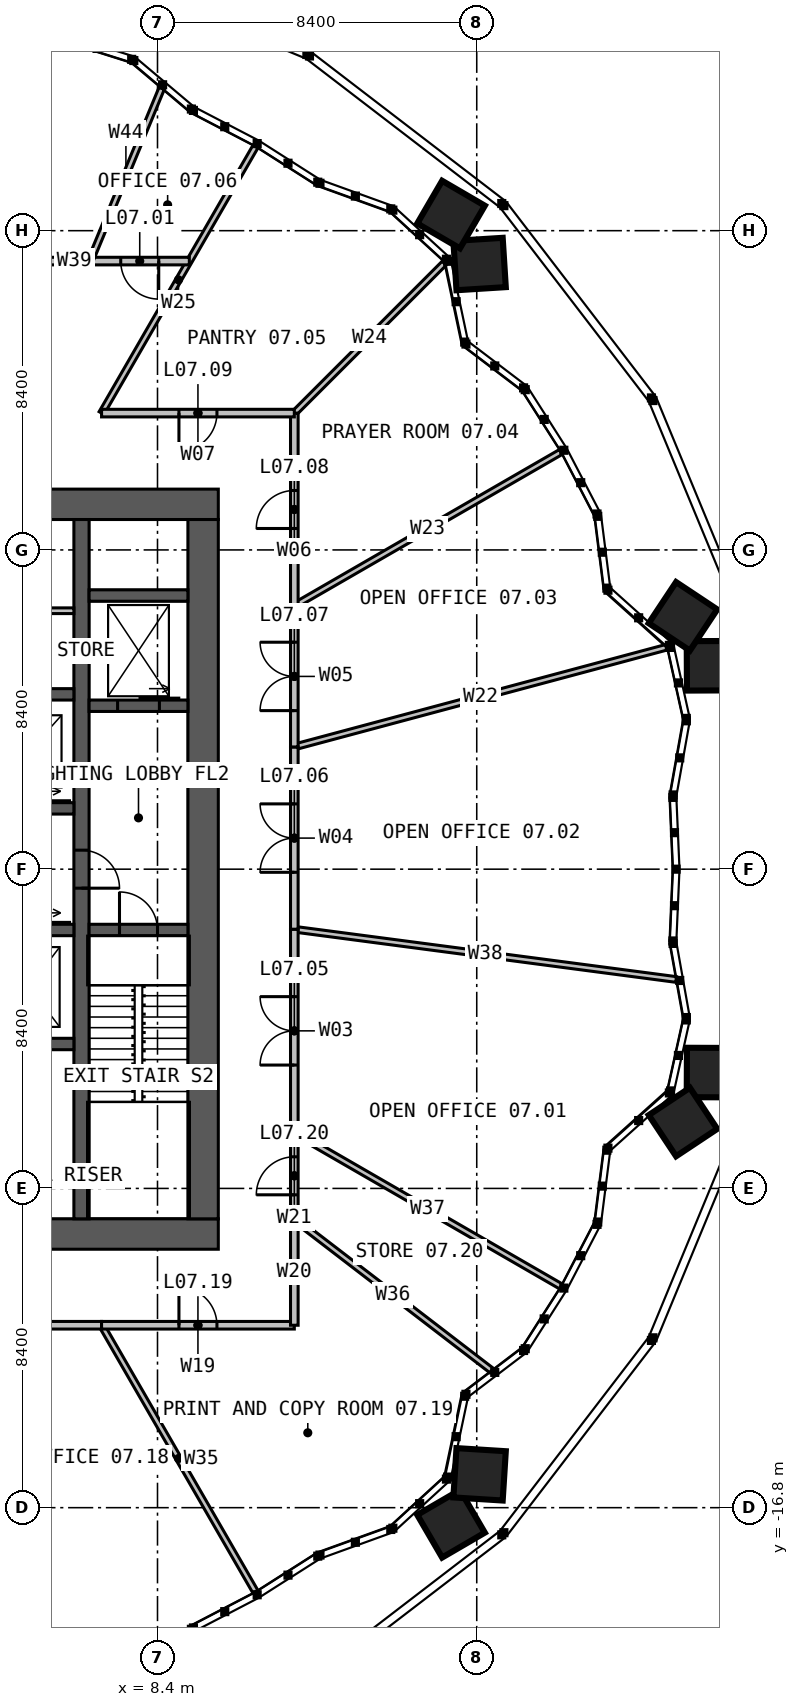
"""IFC4 building model, lengths in metres.
Left out: names, types, materials, properties, quantities, classifications, styles, units other than length and angle.
Written with IfcOpenShell. Run it as: python <this file> out.ifc"""

import sys

from ifc_helpers import new_model, si_unit, direction, frame, frame_2d, origin, place, context, subcontext, project, spatial, rectangle, extrude, element, fill, save


model = new_model("IFC4")
c1 = context("Model", 3, precision=1e-05, world=origin(), true_north=direction((0.0, 1.0)))
c2 = subcontext(c1, "Body", "Model", "MODEL_VIEW")
j1 = project(units=[si_unit("LENGTHUNIT", "METRE"), si_unit("PLANEANGLEUNIT", "RADIAN")], contexts=[c1])
p1 = place(None, origin())
s1 = spatial("IfcSite", under=j1, at=p1, CompositionType="ELEMENT")
p2 = place(p1, origin())
s2 = spatial("IfcBuilding", under=s1, at=p2, CompositionType="ELEMENT")
p3 = place(p2, frame((0.0, 0.0, 33.0)))
s3 = spatial("IfcBuildingStorey", under=s2, at=p3, CompositionType="ELEMENT", Elevation=33.0)
p4 = place(p3, frame((-10.0, 9.6, 0.0), z_axis=(0.0, 0.0, 1.0), x_axis=(1.0, 0.0, 0.0)))
e1 = element("IfcWall", 1, at=p4, inside=s3, PredefinedType="SOLIDWALL", context=c2, shape_type="SweptSolid", body=[
    extrude(rectangle(XDim=20.0, YDim=0.8, at=frame_2d((10.0, 0.0))), origin(), (0.0, 0.0, 1.0), 4.0),
])
p5 = place(p4, frame((9.4, 0.0, 0.0)))
e2 = element("IfcOpeningElement", 2, at=p5, cuts=e1, PredefinedType="OPENING", context=c2, shape_type="SweptSolid", body=[
    extrude(rectangle(XDim=1.2, YDim=2.2, at=frame_2d((0.6, 1.1))), frame((0.0, 0.41, 0.0), z_axis=(0.0, -1.0, 0.0), x_axis=(1.0, 0.0, 0.0)), (0.0, 0.0, 1.0), 0.82),
])
p6 = place(p3, frame((10.0, -9.6, 0.0), z_axis=(0.0, 0.0, 1.0), x_axis=(-1.0, 0.0, 0.0)))
e3 = element("IfcWall", 3, at=p6, inside=s3, PredefinedType="SOLIDWALL", context=c2, shape_type="SweptSolid", body=[
    extrude(rectangle(XDim=20.0, YDim=0.8, at=frame_2d((10.0, 0.0))), origin(), (0.0, 0.0, 1.0), 4.0),
])
p7 = place(p6, frame((6.875, 0.0, 0.0)))
e4 = element("IfcOpeningElement", 4, at=p7, cuts=e3, PredefinedType="OPENING", context=c2, shape_type="SweptSolid", body=[
    extrude(rectangle(XDim=1.2, YDim=2.2, at=frame_2d((0.6, 1.1))), frame((0.0, 0.41, 0.0), z_axis=(0.0, -1.0, 0.0), x_axis=(1.0, 0.0, 0.0)), (0.0, 0.0, 1.0), 0.82),
])
p8 = place(p3, frame((9.6, -9.2, 0.0), z_axis=(0.0, 0.0, 1.0), x_axis=(0.0, 1.0, 0.0)))
e5 = element("IfcWall", 5, at=p8, inside=s3, PredefinedType="SOLIDWALL", context=c2, shape_type="SweptSolid", body=[
    extrude(rectangle(XDim=18.4, YDim=0.8, at=frame_2d((9.2, 0.0))), origin(), (0.0, 0.0, 1.0), 4.0),
])
p9 = place(p3, frame((6.4, 9.2, 0.0), z_axis=(0.0, 0.0, 1.0), x_axis=(0.0, -1.0, 0.0)))
e6 = element("IfcWall", 6, at=p9, inside=s3, PredefinedType="SOLIDWALL", context=c2, shape_type="SweptSolid", body=[
    extrude(rectangle(XDim=18.4, YDim=0.4, at=frame_2d((9.2, 0.0))), origin(), (0.0, 0.0, 1.0), 4.0),
])
p10 = place(p9, frame((8.7, 0.0, 0.0)))
e7 = element("IfcOpeningElement", 7, at=p10, cuts=e6, PredefinedType="OPENING", context=c2, shape_type="SweptSolid", body=[
    extrude(rectangle(XDim=1.0, YDim=2.2, at=frame_2d((0.5, 1.1))), frame((0.0, 0.21, 0.0), z_axis=(0.0, -1.0, 0.0), x_axis=(1.0, 0.0, 0.0)), (0.0, 0.0, 1.0), 0.42),
])
p11 = place(p3, frame((1.35, 1.6, 0.0), z_axis=(0.0, 0.0, 1.0), x_axis=(1.0, 0.0, 0.0)))
e8 = element("IfcWall", 8, at=p11, inside=s3, PredefinedType="SOLIDWALL", context=c2, shape_type="SweptSolid", body=[
    extrude(rectangle(XDim=4.85, YDim=0.3, at=frame_2d((2.425, 0.0))), origin(), (0.0, 0.0, 1.0), 4.0),
])
p12 = place(p11, frame((0.6, 0.0, 0.0)))
e9 = element("IfcOpeningElement", 9, at=p12, cuts=e8, PredefinedType="OPENING", context=c2, shape_type="SweptSolid", body=[
    extrude(rectangle(XDim=1.1, YDim=2.2, at=frame_2d((0.55, 1.1))), frame((0.0, 0.16, 0.0), z_axis=(0.0, -1.0, 0.0), x_axis=(1.0, 0.0, 0.0)), (0.0, 0.0, 1.0), 0.32),
])
p13 = place(p11, frame((3.125, 0.0, 0.0)))
e10 = element("IfcOpeningElement", 10, at=p13, cuts=e8, PredefinedType="OPENING", context=c2, shape_type="SweptSolid", body=[
    extrude(rectangle(XDim=1.1, YDim=2.2, at=frame_2d((0.55, 1.1))), frame((0.0, 0.16, 0.0), z_axis=(0.0, -1.0, 0.0), x_axis=(1.0, 0.0, 0.0)), (0.0, 0.0, 1.0), 0.32),
])
p14 = place(p3, frame((1.35, 4.6, 0.0), z_axis=(0.0, 0.0, 1.0), x_axis=(1.0, 0.0, 0.0)))
e11 = element("IfcWall", 11, at=p14, inside=s3, PredefinedType="SOLIDWALL", context=c2, shape_type="SweptSolid", body=[
    extrude(rectangle(XDim=4.85, YDim=0.3, at=frame_2d((2.425, 0.0))), origin(), (0.0, 0.0, 1.0), 4.0),
])
p15 = place(p3, frame((3.85, -1.6, 0.0), z_axis=(0.0, 0.0, 1.0), x_axis=(1.0, 0.0, 0.0)))
e12 = element("IfcWall", 12, at=p15, inside=s3, PredefinedType="SOLIDWALL", context=c2, shape_type="SweptSolid", body=[
    extrude(rectangle(XDim=2.35, YDim=0.3, at=frame_2d((1.175, 0.0))), origin(), (0.0, 0.0, 1.0), 4.0),
])
p16 = place(p15, frame((0.625, 0.0, 0.0)))
e13 = element("IfcOpeningElement", 13, at=p16, cuts=e12, PredefinedType="OPENING", context=c2, shape_type="SweptSolid", body=[
    extrude(rectangle(XDim=1.1, YDim=2.2, at=frame_2d((0.55, 1.1))), frame((0.0, 0.16, 0.0), z_axis=(0.0, -1.0, 0.0), x_axis=(1.0, 0.0, 0.0)), (0.0, 0.0, 1.0), 0.32),
])
p17 = place(p3, frame((3.85, -4.6, 0.0), z_axis=(0.0, 0.0, 1.0), x_axis=(1.0, 0.0, 0.0)))
e14 = element("IfcWall", 14, at=p17, inside=s3, PredefinedType="SOLIDWALL", context=c2, shape_type="SweptSolid", body=[
    extrude(rectangle(XDim=2.35, YDim=0.3, at=frame_2d((1.175, 0.0))), origin(), (0.0, 0.0, 1.0), 4.0),
])
p18 = place(p3, frame((6.6, -1.6, 0.0), z_axis=(0.0, 0.0, 1.0), x_axis=(1.0, 0.0, 0.0)))
e15 = element("IfcWall", 15, at=p18, inside=s3, PredefinedType="SOLIDWALL", context=c2, shape_type="SweptSolid", body=[
    extrude(rectangle(XDim=2.6, YDim=0.3, at=frame_2d((1.3, 0.0))), origin(), (0.0, 0.0, 1.0), 4.0),
])
p19 = place(p18, frame((0.8, 0.0, 0.0)))
e16 = element("IfcOpeningElement", 16, at=p19, cuts=e15, PredefinedType="OPENING", context=c2, shape_type="SweptSolid", body=[
    extrude(rectangle(XDim=1.0, YDim=2.2, at=frame_2d((0.5, 1.1))), frame((0.0, 0.16, 0.0), z_axis=(0.0, -1.0, 0.0), x_axis=(1.0, 0.0, 0.0)), (0.0, 0.0, 1.0), 0.32),
])
p20 = place(p3, frame((6.6, 4.3, 0.0), z_axis=(0.0, 0.0, 1.0), x_axis=(1.0, 0.0, 0.0)))
e17 = element("IfcWall", 17, at=p20, inside=s3, PredefinedType="SOLIDWALL", context=c2, shape_type="SweptSolid", body=[
    extrude(rectangle(XDim=2.6, YDim=0.3, at=frame_2d((1.3, 0.0))), origin(), (0.0, 0.0, 1.0), 4.0),
])
p21 = place(p20, frame((0.75, 0.0, 0.0)))
e18 = element("IfcOpeningElement", 18, at=p21, cuts=e17, PredefinedType="OPENING", context=c2, shape_type="SweptSolid", body=[
    extrude(rectangle(XDim=1.1, YDim=2.2, at=frame_2d((0.55, 1.1))), frame((0.0, 0.16, 0.0), z_axis=(0.0, -1.0, 0.0), x_axis=(1.0, 0.0, 0.0)), (0.0, 0.0, 1.0), 0.32),
])
p22 = place(p3, frame((6.6, 7.2, 0.0), z_axis=(0.0, 0.0, 1.0), x_axis=(1.0, 0.0, 0.0)))
e19 = element("IfcWall", 19, at=p22, inside=s3, PredefinedType="SOLIDWALL", context=c2, shape_type="SweptSolid", body=[
    extrude(rectangle(XDim=2.6, YDim=0.3, at=frame_2d((1.3, 0.0))), origin(), (0.0, 0.0, 1.0), 4.0),
])
p23 = place(p3, frame((1.35, 6.8, 0.0), z_axis=(0.0, 0.0, 1.0), x_axis=(1.0, 0.0, 0.0)))
e20 = element("IfcWall", 20, at=p23, inside=s3, PredefinedType="PARTITIONING", context=c2, shape_type="SweptSolid", body=[
    extrude(rectangle(XDim=4.85, YDim=0.15, at=frame_2d((2.425, 0.0))), origin(), (0.0, 0.0, 1.0), 3.75),
])
p24 = place(p23, frame((3.15, 0.0, 0.0)))
e21 = element("IfcOpeningElement", 21, at=p24, cuts=e20, PredefinedType="OPENING", context=c2, shape_type="SweptSolid", body=[
    extrude(rectangle(XDim=0.9, YDim=2.2, at=frame_2d((0.45, 1.1))), frame((0.0, 0.085, 0.0), z_axis=(0.0, -1.0, 0.0), x_axis=(1.0, 0.0, 0.0)), (0.0, 0.0, 1.0), 0.17),
])
p25 = place(p3, frame((12.0, -6.928, 0.0), z_axis=(0.0, 0.0, 1.0), x_axis=(0.866020891966, -0.500007814618, 0.0)))
e22 = element("IfcWall", 22, at=p25, inside=s3, PredefinedType="PARTITIONING", context=c2, shape_type="SweptSolid", body=[
    extrude(rectangle(XDim=8.097, YDim=0.15, at=frame_2d((4.048, 0.0))), origin(), (0.0, 0.0, 1.0), 2.79),
])
p26 = place(p3, frame((12.0, -1.58, 0.0), z_axis=(0.0, 0.0, 1.0), x_axis=(0.99144576601, -0.13051932064, 0.0)))
e23 = element("IfcWall", 23, at=p26, inside=s3, PredefinedType="PARTITIONING", context=c2, shape_type="SweptSolid", body=[
    extrude(rectangle(XDim=10.135, YDim=0.15, at=frame_2d((5.067, 0.0))), origin(), (0.0, 0.0, 1.0), 2.79),
])
p27 = place(p3, frame((12.0, 3.215, 0.0), z_axis=(0.0, 0.0, 1.0), x_axis=(0.965923250335, 0.258828658504, 0.0)))
e24 = element("IfcWall", 24, at=p27, inside=s3, PredefinedType="PARTITIONING", context=c2, shape_type="SweptSolid", body=[
    extrude(rectangle(XDim=10.15, YDim=0.15, at=frame_2d((5.075, 0.0))), origin(), (0.0, 0.0, 1.0), 2.79),
])
p28 = place(p3, frame((12.0, 6.928, 0.0), z_axis=(0.0, 0.0, 1.0), x_axis=(0.866020891966, 0.500007814618, 0.0)))
e25 = element("IfcWall", 25, at=p28, inside=s3, PredefinedType="PARTITIONING", context=c2, shape_type="SweptSolid", body=[
    extrude(rectangle(XDim=8.097, YDim=0.15, at=frame_2d((4.048, 0.0))), origin(), (0.0, 0.0, 1.0), 2.79),
])
p29 = place(p3, frame((12.0, 12.0, 0.0), z_axis=(0.0, 0.0, 1.0), x_axis=(0.707106781187, 0.707106781187, 0.0)))
e26 = element("IfcWall", 26, at=p29, inside=s3, PredefinedType="PARTITIONING", context=c2, shape_type="SweptSolid", body=[
    extrude(rectangle(XDim=5.603, YDim=0.15, at=frame_2d((2.802, 0.0))), origin(), (0.0, 0.0, 1.0), 2.79),
])
for number, where, z_axis, x_axis in (
    (27, (6.928, 12.0, 0.0), (0.0, 0.0, 1.0), (0.5, 0.866, 0.0)),
    (28, (6.928, -12.0, 0.0), (0.0, 0.0, 1.0), (0.5, -0.866, 0.0)),
):
    element("IfcWall", number, at=place(p3, frame(where, z_axis=z_axis, x_axis=x_axis)), inside=s3, PredefinedType="PARTITIONING", context=c2, shape_type="SweptSolid", body=[
        extrude(rectangle(XDim=8.097, YDim=0.15, at=frame_2d((4.048, 0.0))), origin(), (0.0, 0.0, 1.0), 2.79),
    ])
p30 = place(p3, frame((12.0, -9.208, 0.0), z_axis=(0.0, 0.0, 1.0), x_axis=(0.793348710976, -0.608767462003, 0.0)))
e29 = element("IfcWall", 29, at=p30, inside=s3, PredefinedType="PARTITIONING", context=c2, shape_type="SweptSolid", body=[
    extrude(rectangle(XDim=6.545, YDim=0.15, at=frame_2d((3.272, 0.0))), origin(), (0.0, 0.0, 1.0), 2.79),
])
p31 = place(p3, frame((12.0, -6.928, 0.0), z_axis=(0.0, 0.0, 1.0), x_axis=(0.0, 1.0, 0.0)))
e30 = element("IfcWall", 30, at=p31, inside=s3, PredefinedType="PARTITIONING", context=c2, shape_type="SweptSolid", body=[
    extrude(rectangle(XDim=5.348, YDim=0.2, at=frame_2d((2.674, 0.0))), origin(), (0.0, 0.0, 1.0), 3.8),
])
p32 = place(p31, frame((1.774, 0.0, 0.0)))
e31 = element("IfcOpeningElement", 31, at=p32, cuts=e30, PredefinedType="OPENING", context=c2, shape_type="SweptSolid", body=[
    extrude(rectangle(XDim=1.8, YDim=2.2, at=frame_2d((0.9, 1.1))), frame((0.0, 0.11, 0.0), z_axis=(0.0, -1.0, 0.0), x_axis=(1.0, 0.0, 0.0)), (0.0, 0.0, 1.0), 0.22),
])
p33 = place(p3, frame((12.0, -1.58, 0.0), z_axis=(0.0, 0.0, 1.0), x_axis=(0.0, 1.0, 0.0)))
e32 = element("IfcWall", 32, at=p33, inside=s3, PredefinedType="PARTITIONING", context=c2, shape_type="SweptSolid", body=[
    extrude(rectangle(XDim=4.795, YDim=0.2, at=frame_2d((2.397, 0.0))), origin(), (0.0, 0.0, 1.0), 3.8),
])
p34 = place(p33, frame((1.498, 0.0, 0.0)))
e33 = element("IfcOpeningElement", 33, at=p34, cuts=e32, PredefinedType="OPENING", context=c2, shape_type="SweptSolid", body=[
    extrude(rectangle(XDim=1.8, YDim=2.2, at=frame_2d((0.9, 1.1))), frame((0.0, 0.11, 0.0), z_axis=(0.0, -1.0, 0.0), x_axis=(1.0, 0.0, 0.0)), (0.0, 0.0, 1.0), 0.22),
])
p35 = place(p3, frame((12.0, 3.215, 0.0), z_axis=(0.0, 0.0, 1.0), x_axis=(0.0, 1.0, 0.0)))
e34 = element("IfcWall", 34, at=p35, inside=s3, PredefinedType="PARTITIONING", context=c2, shape_type="SweptSolid", body=[
    extrude(rectangle(XDim=3.713, YDim=0.2, at=frame_2d((1.856, 0.0))), origin(), (0.0, 0.0, 1.0), 3.8),
])
p36 = place(p35, frame((0.956, 0.0, 0.0)))
e35 = element("IfcOpeningElement", 35, at=p36, cuts=e34, PredefinedType="OPENING", context=c2, shape_type="SweptSolid", body=[
    extrude(rectangle(XDim=1.8, YDim=2.2, at=frame_2d((0.9, 1.1))), frame((0.0, 0.11, 0.0), z_axis=(0.0, -1.0, 0.0), x_axis=(1.0, 0.0, 0.0)), (0.0, 0.0, 1.0), 0.22),
])
p37 = place(p3, frame((12.0, 6.928, 0.0), z_axis=(0.0, 0.0, 1.0), x_axis=(0.0, 1.0, 0.0)))
e36 = element("IfcWall", 36, at=p37, inside=s3, PredefinedType="PARTITIONING", context=c2, shape_type="SweptSolid", body=[
    extrude(rectangle(XDim=5.072, YDim=0.2, at=frame_2d((2.536, 0.0))), origin(), (0.0, 0.0, 1.0), 3.8),
])
p38 = place(p37, frame((2.036, 0.0, 0.0)))
e37 = element("IfcOpeningElement", 37, at=p38, cuts=e36, PredefinedType="OPENING", context=c2, shape_type="SweptSolid", body=[
    extrude(rectangle(XDim=1.0, YDim=2.2, at=frame_2d((0.5, 1.1))), frame((0.0, 0.11, 0.0), z_axis=(0.0, -1.0, 0.0), x_axis=(1.0, 0.0, 0.0)), (0.0, 0.0, 1.0), 0.22),
])
p39 = place(p3, frame((12.0, 12.0, 0.0), z_axis=(0.0, 0.0, 1.0), x_axis=(-1.0, 0.0, 0.0)))
e38 = element("IfcWall", 38, at=p39, inside=s3, PredefinedType="PARTITIONING", context=c2, shape_type="SweptSolid", body=[
    extrude(rectangle(XDim=5.072, YDim=0.2, at=frame_2d((2.536, 0.0))), origin(), (0.0, 0.0, 1.0), 3.8),
])
p40 = place(p39, frame((2.036, 0.0, 0.0)))
e39 = element("IfcOpeningElement", 39, at=p40, cuts=e38, PredefinedType="OPENING", context=c2, shape_type="SweptSolid", body=[
    extrude(rectangle(XDim=1.0, YDim=2.2, at=frame_2d((0.5, 1.1))), frame((0.0, 0.11, 0.0), z_axis=(0.0, -1.0, 0.0), x_axis=(1.0, 0.0, 0.0)), (0.0, 0.0, 1.0), 0.22),
])
p41 = place(p3, frame((9.238, 16.0, 0.0), z_axis=(0.0, 0.0, 1.0), x_axis=(-1.0, 0.0, 0.0)))
e40 = element("IfcWall", 40, at=p41, inside=s3, PredefinedType="PARTITIONING", context=c2, shape_type="SweptSolid", body=[
    extrude(rectangle(XDim=6.057, YDim=0.2, at=frame_2d((3.029, 0.0))), origin(), (0.0, 0.0, 1.0), 3.8),
])
p42 = place(p41, frame((0.805, 0.0, 0.0)))
e41 = element("IfcOpeningElement", 41, at=p42, cuts=e40, PredefinedType="OPENING", context=c2, shape_type="SweptSolid", body=[
    extrude(rectangle(XDim=1.0, YDim=2.2, at=frame_2d((0.5, 1.1))), frame((0.0, 0.11, 0.0), z_axis=(0.0, -1.0, 0.0), x_axis=(1.0, 0.0, 0.0)), (0.0, 0.0, 1.0), 0.22),
])
p43 = place(p3, frame((6.627, 16.0, 0.0), z_axis=(0.0, 0.0, 1.0), x_axis=(0.38266590054, 0.923886794236, 0.0)))
e42 = element("IfcWall", 42, at=p43, inside=s3, PredefinedType="PARTITIONING", context=c2, shape_type="SweptSolid", body=[
    extrude(rectangle(XDim=4.92, YDim=0.15, at=frame_2d((2.46, 0.0))), origin(), (0.0, 0.0, 1.0), 2.79),
])
p44 = place(p3, frame((1.58, -12.0, 0.0), z_axis=(0.0, 0.0, 1.0), x_axis=(1.0, 0.0, 0.0)))
e43 = element("IfcWall", 43, at=p44, inside=s3, PredefinedType="PARTITIONING", context=c2, shape_type="SweptSolid", body=[
    extrude(rectangle(XDim=5.348, YDim=0.2, at=frame_2d((2.674, 0.0))), origin(), (0.0, 0.0, 1.0), 3.8),
])
p45 = place(p44, frame((1.774, 0.0, 0.0)))
e44 = element("IfcOpeningElement", 44, at=p45, cuts=e43, PredefinedType="OPENING", context=c2, shape_type="SweptSolid", body=[
    extrude(rectangle(XDim=1.8, YDim=2.2, at=frame_2d((0.9, 1.1))), frame((0.0, 0.11, 0.0), z_axis=(0.0, -1.0, 0.0), x_axis=(1.0, 0.0, 0.0)), (0.0, 0.0, 1.0), 0.22),
])
p46 = place(p3, frame((6.928, -12.0, 0.0), z_axis=(0.0, 0.0, 1.0), x_axis=(1.0, 0.0, 0.0)))
e45 = element("IfcWall", 45, at=p46, inside=s3, PredefinedType="PARTITIONING", context=c2, shape_type="SweptSolid", body=[
    extrude(rectangle(XDim=5.072, YDim=0.2, at=frame_2d((2.536, 0.0))), origin(), (0.0, 0.0, 1.0), 3.8),
])
p47 = place(p46, frame((2.036, 0.0, 0.0)))
e46 = element("IfcOpeningElement", 46, at=p47, cuts=e45, PredefinedType="OPENING", context=c2, shape_type="SweptSolid", body=[
    extrude(rectangle(XDim=1.0, YDim=2.2, at=frame_2d((0.5, 1.1))), frame((0.0, 0.11, 0.0), z_axis=(0.0, -1.0, 0.0), x_axis=(1.0, 0.0, 0.0)), (0.0, 0.0, 1.0), 0.22),
])
p48 = place(p3, frame((12.0, -12.0, 0.0), z_axis=(0.0, 0.0, 1.0), x_axis=(0.0, 1.0, 0.0)))
e47 = element("IfcWall", 47, at=p48, inside=s3, PredefinedType="PARTITIONING", context=c2, shape_type="SweptSolid", body=[
    extrude(rectangle(XDim=2.792, YDim=0.2, at=frame_2d((1.396, 0.0))), origin(), (0.0, 0.0, 1.0), 3.8),
])
p49 = place(p3, frame((12.0, -9.208, 0.0), z_axis=(0.0, 0.0, 1.0), x_axis=(0.0, 1.0, 0.0)))
e48 = element("IfcWall", 48, at=p49, inside=s3, PredefinedType="PARTITIONING", context=c2, shape_type="SweptSolid", body=[
    extrude(rectangle(XDim=2.28, YDim=0.2, at=frame_2d((1.14, 0.0))), origin(), (0.0, 0.0, 1.0), 3.8),
])
p50 = place(p49, frame((0.64, 0.0, 0.0)))
e49 = element("IfcOpeningElement", 49, at=p50, cuts=e48, PredefinedType="OPENING", context=c2, shape_type="SweptSolid", body=[
    extrude(rectangle(XDim=1.0, YDim=2.2, at=frame_2d((0.5, 1.1))), frame((0.0, 0.11, 0.0), z_axis=(0.0, -1.0, 0.0), x_axis=(1.0, 0.0, 0.0)), (0.0, 0.0, 1.0), 0.22),
])
p51 = place(p10, origin())
e50 = element("IfcDoor", 50, at=p51, inside=s3, OperationType="SINGLE_SWING_RIGHT", PredefinedType="DOOR", context=c2, shape_type="SweptSolid", body=[
    extrude(rectangle(XDim=1.0, YDim=2.2, at=frame_2d((0.5, 1.1))), frame((0.0, 0.025, 0.0), z_axis=(0.0, -1.0, 0.0), x_axis=(1.0, 0.0, 0.0)), (0.0, 0.0, 1.0), 0.05),
])
fill(e7, e50)
p52 = place(p19, origin())
e51 = element("IfcDoor", 51, at=p52, inside=s3, OperationType="SINGLE_SWING_LEFT", PredefinedType="DOOR", context=c2, shape_type="SweptSolid", body=[
    extrude(rectangle(XDim=1.0, YDim=2.2, at=frame_2d((0.5, 1.1))), frame((0.0, 0.025, 0.0), z_axis=(0.0, -1.0, 0.0), x_axis=(1.0, 0.0, 0.0)), (0.0, 0.0, 1.0), 0.05),
])
fill(e16, e51)
p53 = place(p21, origin())
e52 = element("IfcDoor", 52, at=p53, inside=s3, OperationType="SLIDING_TO_LEFT", PredefinedType="DOOR", context=c2, shape_type="SweptSolid", body=[
    extrude(rectangle(XDim=1.1, YDim=2.2, at=frame_2d((0.55, 1.1))), frame((0.0, 0.025, 0.0), z_axis=(0.0, -1.0, 0.0), x_axis=(1.0, 0.0, 0.0)), (0.0, 0.0, 1.0), 0.05),
])
fill(e18, e52)
p54 = place(p32, origin())
e53 = element("IfcDoor", 53, at=p54, inside=s3, OperationType="DOUBLE_DOOR_SINGLE_SWING", PredefinedType="DOOR", context=c2, shape_type="SweptSolid", body=[
    extrude(rectangle(XDim=1.8, YDim=2.2, at=frame_2d((0.9, 1.1))), frame((0.0, 0.025, 0.0), z_axis=(0.0, -1.0, 0.0), x_axis=(1.0, 0.0, 0.0)), (0.0, 0.0, 1.0), 0.05),
])
fill(e31, e53)
p55 = place(p34, origin())
e54 = element("IfcDoor", 54, at=p55, inside=s3, OperationType="DOUBLE_DOOR_SINGLE_SWING", PredefinedType="DOOR", context=c2, shape_type="SweptSolid", body=[
    extrude(rectangle(XDim=1.8, YDim=2.2, at=frame_2d((0.9, 1.1))), frame((0.0, 0.025, 0.0), z_axis=(0.0, -1.0, 0.0), x_axis=(1.0, 0.0, 0.0)), (0.0, 0.0, 1.0), 0.05),
])
fill(e33, e54)
p56 = place(p36, origin())
e55 = element("IfcDoor", 55, at=p56, inside=s3, OperationType="DOUBLE_DOOR_SINGLE_SWING", PredefinedType="DOOR", context=c2, shape_type="SweptSolid", body=[
    extrude(rectangle(XDim=1.8, YDim=2.2, at=frame_2d((0.9, 1.1))), frame((0.0, 0.025, 0.0), z_axis=(0.0, -1.0, 0.0), x_axis=(1.0, 0.0, 0.0)), (0.0, 0.0, 1.0), 0.05),
])
fill(e35, e55)
p57 = place(p38, origin())
e56 = element("IfcDoor", 56, at=p57, inside=s3, OperationType="SINGLE_SWING_LEFT", PredefinedType="DOOR", context=c2, shape_type="SweptSolid", body=[
    extrude(rectangle(XDim=1.0, YDim=2.2, at=frame_2d((0.5, 1.1))), frame((0.0, 0.025, 0.0), z_axis=(0.0, -1.0, 0.0), x_axis=(1.0, 0.0, 0.0)), (0.0, 0.0, 1.0), 0.05),
])
fill(e37, e56)
p58 = place(p40, origin())
e57 = element("IfcDoor", 57, at=p58, inside=s3, OperationType="SINGLE_SWING_RIGHT", PredefinedType="DOOR", context=c2, shape_type="SweptSolid", body=[
    extrude(rectangle(XDim=1.0, YDim=2.2, at=frame_2d((0.5, 1.1))), frame((0.0, 0.025, 0.0), z_axis=(0.0, -1.0, 0.0), x_axis=(1.0, 0.0, 0.0)), (0.0, 0.0, 1.0), 0.05),
])
fill(e39, e57)
p59 = place(p42, origin())
e58 = element("IfcDoor", 58, at=p59, inside=s3, OperationType="SINGLE_SWING_LEFT", PredefinedType="DOOR", context=c2, shape_type="SweptSolid", body=[
    extrude(rectangle(XDim=1.0, YDim=2.2, at=frame_2d((0.5, 1.1))), frame((0.0, 0.025, 0.0), z_axis=(0.0, -1.0, 0.0), x_axis=(1.0, 0.0, 0.0)), (0.0, 0.0, 1.0), 0.05),
])
fill(e41, e58)
p60 = place(p47, origin())
e59 = element("IfcDoor", 59, at=p60, inside=s3, OperationType="SINGLE_SWING_LEFT", PredefinedType="DOOR", context=c2, shape_type="SweptSolid", body=[
    extrude(rectangle(XDim=1.0, YDim=2.2, at=frame_2d((0.5, 1.1))), frame((0.0, 0.025, 0.0), z_axis=(0.0, -1.0, 0.0), x_axis=(1.0, 0.0, 0.0)), (0.0, 0.0, 1.0), 0.05),
])
fill(e46, e59)
p61 = place(p50, origin())
e60 = element("IfcDoor", 60, at=p61, inside=s3, OperationType="SINGLE_SWING_LEFT", PredefinedType="DOOR", context=c2, shape_type="SweptSolid", body=[
    extrude(rectangle(XDim=1.0, YDim=2.2, at=frame_2d((0.5, 1.1))), frame((0.0, 0.025, 0.0), z_axis=(0.0, -1.0, 0.0), x_axis=(1.0, 0.0, 0.0)), (0.0, 0.0, 1.0), 0.05),
])
fill(e49, e60)
save(model, sys.argv[1])
